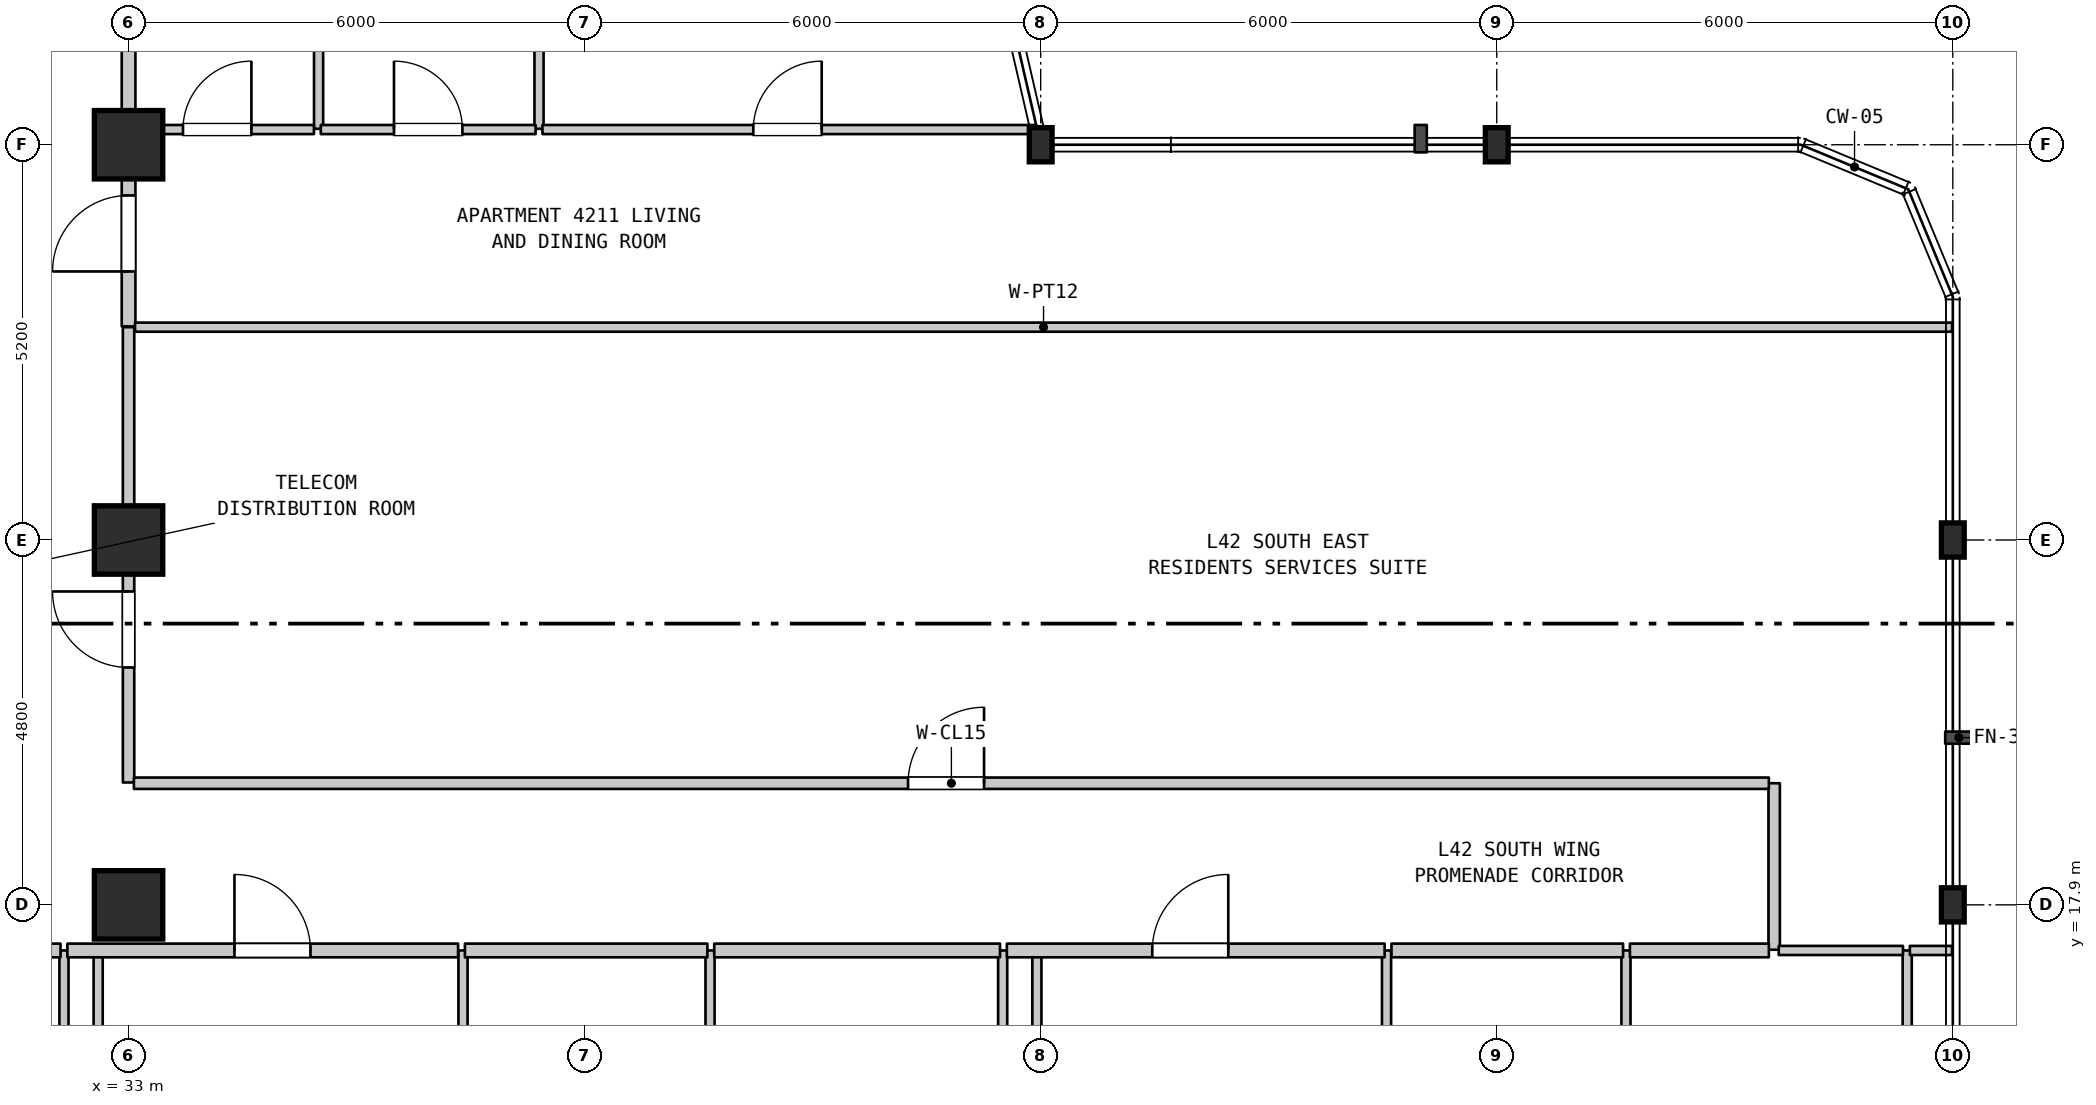
"""IFC4 building model, lengths in metres.
Left out: names, types, materials, properties, quantities, classifications, styles, units other than length and angle.
Written with IfcOpenShell. Run it as: python <this file> out.ifc"""

import sys

from ifc_helpers import new_model, si_unit, direction, frame, frame_2d, origin, origin_2d, place, context, subcontext, project, spatial, rectangle, i_section, extrude, element, fill, save


model = new_model("IFC4")
c1 = context("Model", 3, precision=1e-05, world=origin(), true_north=direction((0.0, 1.0)))
c2 = subcontext(c1, "Body", "Model", "MODEL_VIEW")
j1 = project(units=[si_unit("LENGTHUNIT", "METRE"), si_unit("PLANEANGLEUNIT", "RADIAN")], contexts=[c1])
p1 = place(None, origin())
s1 = spatial("IfcSite", under=j1, at=p1, CompositionType="ELEMENT")
p2 = place(p1, origin())
s2 = spatial("IfcBuilding", under=s1, at=p2, CompositionType="ELEMENT")
p3 = place(p2, frame((0.0, 0.0, 172.8)))
s3 = spatial("IfcBuildingStorey", under=s2, at=p3, CompositionType="ELEMENT", Elevation=172.8)
for number, where, z_axis, x_axis in (
    (1, (33.0, 17.9, 0.0), (0.0, 0.0, 1.0), (1.0, 0.0, 0.0)),
    (2, (33.0, 22.7, 0.0), (0.0, 0.0, 1.0), (1.0, 0.0, 0.0)),
    (3, (33.0, 27.9, 0.0), (0.0, 0.0, 1.0), (1.0, 0.0, 0.0)),
):
    element("IfcColumn", number, at=place(p3, frame(where, z_axis=z_axis, x_axis=x_axis)), inside=s3, PredefinedType="COLUMN", context=c2, shape_type="SweptSolid", body=[
        extrude(rectangle(XDim=0.9, YDim=0.9, at=origin_2d()), origin(), (0.0, 0.0, 1.0), 3.7),
    ])
for number, where, z_axis, x_axis in (
    (4, (45.0, 27.9, 0.0), (0.0, 0.0, 1.0), (1.0, 0.0, 0.0)),
    (5, (51.0, 27.9, 0.0), (0.0, 0.0, 1.0), (1.0, 0.0, 0.0)),
    (6, (57.0, 17.9, 0.0), (0.0, 0.0, 1.0), (1.0, 0.0, 0.0)),
    (7, (57.0, 22.7, 0.0), (0.0, 0.0, 1.0), (1.0, 0.0, 0.0)),
):
    element("IfcColumn", number, at=place(p3, frame(where, z_axis=z_axis, x_axis=x_axis)), inside=s3, PredefinedType="COLUMN", context=c2, shape_type="SweptSolid", body=[
        extrude(i_section(OverallWidth=0.3, OverallDepth=0.45, WebThickness=0.014, FlangeThickness=0.026, FilletRadius=0.027, at=origin_2d()), origin(), (0.0, 0.0, 1.0), 3.7),
    ])
p4 = place(p3, frame((32.15, 11.15, 0.0), z_axis=(0.0, 0.0, 1.0), x_axis=(0.0, 1.0, 0.0)))
e8 = element("IfcWall", 8, at=p4, inside=s3, PredefinedType="PARTITIONING", context=c2, shape_type="SweptSolid", body=[
    extrude(rectangle(XDim=6.15, YDim=0.12, at=frame_2d((3.075, 0.0))), origin(), (0.0, 0.0, 1.0), 3.39),
])
p5 = place(p3, frame((32.6, 14.85, 0.0), z_axis=(0.0, 0.0, 1.0), x_axis=(0.0, 1.0, 0.0)))
e9 = element("IfcWall", 9, at=p5, inside=s3, PredefinedType="PARTITIONING", context=c2, shape_type="SweptSolid", body=[
    extrude(rectangle(XDim=2.45, YDim=0.12, at=frame_2d((1.225, 0.0))), origin(), (0.0, 0.0, 1.0), 3.39),
])
p6 = place(p3, frame((33.0, 19.51, 0.0), z_axis=(0.0, 0.0, 1.0), x_axis=(0.0, 1.0, 0.0)))
e10 = element("IfcWall", 10, at=p6, inside=s3, PredefinedType="STANDARD", context=c2, shape_type="SweptSolid", body=[
    extrude(rectangle(XDim=5.99, YDim=0.15, at=frame_2d((2.995, 0.0))), origin(), (0.0, 0.0, 1.0), 2.99),
])
p7 = place(p6, frame((1.513, 0.0, 0.0)))
e11 = element("IfcOpeningElement", 11, at=p7, cuts=e10, PredefinedType="OPENING", context=c2, shape_type="SweptSolid", body=[
    extrude(rectangle(XDim=1.0, YDim=2.15, at=frame_2d((0.5, 1.075))), frame((0.0, 0.085, 0.0), z_axis=(0.0, -1.0, 0.0), x_axis=(1.0, 0.0, 0.0)), (0.0, 0.0, 1.0), 0.17),
])
p8 = place(p3, frame((33.0, 25.51, 0.0), z_axis=(0.0, 0.0, 1.0), x_axis=(0.0, 1.0, 0.0)))
e12 = element("IfcWall", 12, at=p8, inside=s3, PredefinedType="STANDARD", context=c2, shape_type="SweptSolid", body=[
    extrude(rectangle(XDim=2.6, YDim=0.18, at=frame_2d((1.3, 0.0))), origin(), (0.0, 0.0, 1.0), 2.99),
])
p9 = place(p8, frame((0.723, 0.0, 0.0)))
e13 = element("IfcOpeningElement", 13, at=p9, cuts=e12, PredefinedType="OPENING", context=c2, shape_type="SweptSolid", body=[
    extrude(rectangle(XDim=1.0, YDim=2.15, at=frame_2d((0.5, 1.075))), frame((0.0, 0.1, 0.0), z_axis=(0.0, -1.0, 0.0), x_axis=(1.0, 0.0, 0.0)), (0.0, 0.0, 1.0), 0.2),
])
p10 = place(p3, frame((33.0, 28.11, 0.0), z_axis=(0.0, 0.0, 1.0), x_axis=(0.0, 1.0, 0.0)))
e14 = element("IfcWall", 14, at=p10, inside=s3, PredefinedType="STANDARD", context=c2, shape_type="SweptSolid", body=[
    extrude(rectangle(XDim=4.69, YDim=0.18, at=frame_2d((2.345, 0.0))), origin(), (0.0, 0.0, 1.0), 2.89),
])
p11 = place(p3, frame((35.5, 28.11, 0.0), z_axis=(0.0, 0.0, 1.0), x_axis=(0.0, 1.0, 0.0)))
e15 = element("IfcWall", 15, at=p11, inside=s3, PredefinedType="PARTITIONING", context=c2, shape_type="SweptSolid", body=[
    extrude(rectangle(XDim=4.69, YDim=0.12, at=frame_2d((2.345, 0.0))), origin(), (0.0, 0.0, 1.0), 3.39),
])
p12 = place(p3, frame((37.4, 11.15, 0.0), z_axis=(0.0, 0.0, 1.0), x_axis=(0.0, 1.0, 0.0)))
e16 = element("IfcWall", 16, at=p12, inside=s3, PredefinedType="PARTITIONING", context=c2, shape_type="SweptSolid", body=[
    extrude(rectangle(XDim=6.15, YDim=0.12, at=frame_2d((3.075, 0.0))), origin(), (0.0, 0.0, 1.0), 3.39),
])
p13 = place(p3, frame((38.4, 28.11, 0.0), z_axis=(0.0, 0.0, 1.0), x_axis=(0.0, 1.0, 0.0)))
e17 = element("IfcWall", 17, at=p13, inside=s3, PredefinedType="PARTITIONING", context=c2, shape_type="SweptSolid", body=[
    extrude(rectangle(XDim=4.69, YDim=0.12, at=frame_2d((2.345, 0.0))), origin(), (0.0, 0.0, 1.0), 3.39),
])
for number, where, z_axis, x_axis in (
    (18, (40.65, 11.15, 0.0), (0.0, 0.0, 1.0), (0.0, 1.0, 0.0)),
    (19, (44.5, 11.15, 0.0), (0.0, 0.0, 1.0), (0.0, 1.0, 0.0)),
):
    element("IfcWall", number, at=place(p3, frame(where, z_axis=z_axis, x_axis=x_axis)), inside=s3, PredefinedType="PARTITIONING", context=c2, shape_type="SweptSolid", body=[
        extrude(rectangle(XDim=6.15, YDim=0.12, at=frame_2d((3.075, 0.0))), origin(), (0.0, 0.0, 1.0), 3.39),
    ])
p14 = place(p3, frame((44.95, 0.71, 0.0), z_axis=(0.0, 0.0, 1.0), x_axis=(0.0, 1.0, 0.0)))
e20 = element("IfcWall", 20, at=p14, inside=s3, PredefinedType="PARTITIONING", context=c2, shape_type="SweptSolid", body=[
    extrude(rectangle(XDim=16.59, YDim=0.12, at=frame_2d((8.295, 0.0))), origin(), (0.0, 0.0, 1.0), 3.39),
])
for number, where, z_axis, x_axis in (
    (21, (49.55, 11.15, 0.0), (0.0, 0.0, 1.0), (0.0, 1.0, 0.0)),
    (22, (52.7, 11.15, 0.0), (0.0, 0.0, 1.0), (0.0, 1.0, 0.0)),
):
    element("IfcWall", number, at=place(p3, frame(where, z_axis=z_axis, x_axis=x_axis)), inside=s3, PredefinedType="PARTITIONING", context=c2, shape_type="SweptSolid", body=[
        extrude(rectangle(XDim=6.15, YDim=0.12, at=frame_2d((3.075, 0.0))), origin(), (0.0, 0.0, 1.0), 3.39),
    ])
p15 = place(p3, frame((54.65, 17.31, 0.0), z_axis=(0.0, 0.0, 1.0), x_axis=(0.0, 1.0, 0.0)))
e23 = element("IfcWall", 23, at=p15, inside=s3, PredefinedType="STANDARD", context=c2, shape_type="SweptSolid", body=[
    extrude(rectangle(XDim=2.19, YDim=0.15, at=frame_2d((1.095, 0.0))), origin(), (0.0, 0.0, 1.0), 3.39),
])
p16 = place(p3, frame((56.4, 11.15, 0.0), z_axis=(0.0, 0.0, 1.0), x_axis=(0.0, 1.0, 0.0)))
e24 = element("IfcWall", 24, at=p16, inside=s3, PredefinedType="PARTITIONING", context=c2, shape_type="SweptSolid", body=[
    extrude(rectangle(XDim=6.15, YDim=0.12, at=frame_2d((3.075, 0.0))), origin(), (0.0, 0.0, 1.0), 3.39),
])
p17 = place(p3, frame((28.512, 17.3, 0.0), z_axis=(0.0, 0.0, 1.0), x_axis=(1.0, 0.0, 0.0)))
e25 = element("IfcWall", 25, at=p17, inside=s3, PredefinedType="STANDARD", context=c2, shape_type="SweptSolid", body=[
    extrude(rectangle(XDim=3.593, YDim=0.18, at=frame_2d((1.796, 0.0))), origin(), (0.0, 0.0, 1.0), 3.39),
])
p18 = place(p3, frame((32.195, 17.3, 0.0), z_axis=(0.0, 0.0, 1.0), x_axis=(1.0, 0.0, 0.0)))
e26 = element("IfcWall", 26, at=p18, inside=s3, PredefinedType="STANDARD", context=c2, shape_type="SweptSolid", body=[
    extrude(rectangle(XDim=5.14, YDim=0.18, at=frame_2d((2.57, 0.0))), origin(), (0.0, 0.0, 1.0), 3.39),
])
p19 = place(p18, frame((2.198, 0.0, 0.0)))
e27 = element("IfcOpeningElement", 27, at=p19, cuts=e26, PredefinedType="OPENING", context=c2, shape_type="SweptSolid", body=[
    extrude(rectangle(XDim=1.0, YDim=2.15, at=frame_2d((0.5, 1.075))), frame((0.0, 0.1, 0.0), z_axis=(0.0, -1.0, 0.0), x_axis=(1.0, 0.0, 0.0)), (0.0, 0.0, 1.0), 0.2),
])
p20 = place(p3, frame((37.425, 17.3, 0.0), z_axis=(0.0, 0.0, 1.0), x_axis=(1.0, 0.0, 0.0)))
e28 = element("IfcWall", 28, at=p20, inside=s3, PredefinedType="STANDARD", context=c2, shape_type="SweptSolid", body=[
    extrude(rectangle(XDim=3.19, YDim=0.18, at=frame_2d((1.595, 0.0))), origin(), (0.0, 0.0, 1.0), 3.39),
])
p21 = place(p3, frame((40.705, 17.3, 0.0), z_axis=(0.0, 0.0, 1.0), x_axis=(1.0, 0.0, 0.0)))
e29 = element("IfcWall", 29, at=p21, inside=s3, PredefinedType="STANDARD", context=c2, shape_type="SweptSolid", body=[
    extrude(rectangle(XDim=3.76, YDim=0.18, at=frame_2d((1.88, 0.0))), origin(), (0.0, 0.0, 1.0), 3.39),
])
p22 = place(p3, frame((44.555, 17.3, 0.0), z_axis=(0.0, 0.0, 1.0), x_axis=(1.0, 0.0, 0.0)))
e30 = element("IfcWall", 30, at=p22, inside=s3, PredefinedType="STANDARD", context=c2, shape_type="SweptSolid", body=[
    extrude(rectangle(XDim=4.97, YDim=0.18, at=frame_2d((2.485, 0.0))), origin(), (0.0, 0.0, 1.0), 3.39),
])
p23 = place(p22, frame((1.913, 0.0, 0.0)))
e31 = element("IfcOpeningElement", 31, at=p23, cuts=e30, PredefinedType="OPENING", context=c2, shape_type="SweptSolid", body=[
    extrude(rectangle(XDim=1.0, YDim=2.15, at=frame_2d((0.5, 1.075))), frame((0.0, 0.1, 0.0), z_axis=(0.0, -1.0, 0.0), x_axis=(1.0, 0.0, 0.0)), (0.0, 0.0, 1.0), 0.2),
])
p24 = place(p3, frame((49.615, 17.3, 0.0), z_axis=(0.0, 0.0, 1.0), x_axis=(1.0, 0.0, 0.0)))
e32 = element("IfcWall", 32, at=p24, inside=s3, PredefinedType="STANDARD", context=c2, shape_type="SweptSolid", body=[
    extrude(rectangle(XDim=3.047, YDim=0.18, at=frame_2d((1.523, 0.0))), origin(), (0.0, 0.0, 1.0), 3.39),
])
p25 = place(p3, frame((52.752, 17.3, 0.0), z_axis=(0.0, 0.0, 1.0), x_axis=(1.0, 0.0, 0.0)))
e33 = element("IfcWall", 33, at=p25, inside=s3, PredefinedType="STANDARD", context=c2, shape_type="SweptSolid", body=[
    extrude(rectangle(XDim=1.828, YDim=0.18, at=frame_2d((0.914, 0.0))), origin(), (0.0, 0.0, 1.0), 3.39),
])
p26 = place(p3, frame((54.71, 17.3, 0.0), z_axis=(0.0, 0.0, 1.0), x_axis=(1.0, 0.0, 0.0)))
e34 = element("IfcWall", 34, at=p26, inside=s3, PredefinedType="PARTITIONING", context=c2, shape_type="SweptSolid", body=[
    extrude(rectangle(XDim=1.635, YDim=0.12, at=frame_2d((0.817, 0.0))), origin(), (0.0, 0.0, 1.0), 3.39),
])
p27 = place(p3, frame((56.435, 17.3, 0.0), z_axis=(0.0, 0.0, 1.0), x_axis=(1.0, 0.0, 0.0)))
e35 = element("IfcWall", 35, at=p27, inside=s3, PredefinedType="PARTITIONING", context=c2, shape_type="SweptSolid", body=[
    extrude(rectangle(XDim=0.555, YDim=0.12, at=frame_2d((0.277, 0.0))), origin(), (0.0, 0.0, 1.0), 3.39),
])
p28 = place(p3, frame((33.07, 19.5, 0.0), z_axis=(0.0, 0.0, 1.0), x_axis=(1.0, 0.0, 0.0)))
e36 = element("IfcWall", 36, at=p28, inside=s3, PredefinedType="STANDARD", context=c2, shape_type="SweptSolid", body=[
    extrude(rectangle(XDim=21.51, YDim=0.15, at=frame_2d((10.755, 0.0))), origin(), (0.0, 0.0, 1.0), 3.39),
])
p29 = place(p28, frame((10.185, 0.0, 0.0)))
e37 = element("IfcOpeningElement", 37, at=p29, cuts=e36, PredefinedType="OPENING", context=c2, shape_type="SweptSolid", body=[
    extrude(rectangle(XDim=1.0, YDim=2.15, at=frame_2d((0.5, 1.075))), frame((0.0, 0.085, 0.0), z_axis=(0.0, -1.0, 0.0), x_axis=(1.0, 0.0, 0.0)), (0.0, 0.0, 1.0), 0.17),
])
p30 = place(p3, frame((33.085, 25.5, 0.0), z_axis=(0.0, 0.0, 1.0), x_axis=(1.0, 0.0, 0.0)))
e38 = element("IfcWall", 38, at=p30, inside=s3, PredefinedType="PARTITIONING", context=c2, shape_type="SweptSolid", body=[
    extrude(rectangle(XDim=23.905, YDim=0.12, at=frame_2d((11.953, 0.0))), origin(), (0.0, 0.0, 1.0), 3.39),
])
p31 = place(p3, frame((33.075, 28.1, 0.0), z_axis=(0.0, 0.0, 1.0), x_axis=(1.0, 0.0, 0.0)))
e39 = element("IfcWall", 39, at=p31, inside=s3, PredefinedType="PARTITIONING", context=c2, shape_type="SweptSolid", body=[
    extrude(rectangle(XDim=2.364, YDim=0.12, at=frame_2d((1.182, 0.0))), origin(), (0.0, 0.0, 1.0), 3.39),
])
p32 = place(p31, frame((0.641, 0.0, 0.0)))
e40 = element("IfcOpeningElement", 40, at=p32, cuts=e39, PredefinedType="OPENING", context=c2, shape_type="SweptSolid", body=[
    extrude(rectangle(XDim=0.9, YDim=2.15, at=frame_2d((0.45, 1.075))), frame((0.0, 0.07, 0.0), z_axis=(0.0, -1.0, 0.0), x_axis=(1.0, 0.0, 0.0)), (0.0, 0.0, 1.0), 0.14),
])
p33 = place(p3, frame((35.529, 28.1, 0.0), z_axis=(0.0, 0.0, 1.0), x_axis=(1.0, 0.0, 0.0)))
e41 = element("IfcWall", 41, at=p33, inside=s3, PredefinedType="PARTITIONING", context=c2, shape_type="SweptSolid", body=[
    extrude(rectangle(XDim=2.826, YDim=0.12, at=frame_2d((1.413, 0.0))), origin(), (0.0, 0.0, 1.0), 3.39),
])
p34 = place(p33, frame((0.963, 0.0, 0.0)))
e42 = element("IfcOpeningElement", 42, at=p34, cuts=e41, PredefinedType="OPENING", context=c2, shape_type="SweptSolid", body=[
    extrude(rectangle(XDim=0.9, YDim=2.1, at=frame_2d((0.45, 1.05))), frame((0.0, 0.07, 0.0), z_axis=(0.0, -1.0, 0.0), x_axis=(1.0, 0.0, 0.0)), (0.0, 0.0, 1.0), 0.14),
])
p35 = place(p3, frame((38.445, 28.1, 0.0), z_axis=(0.0, 0.0, 1.0), x_axis=(1.0, 0.0, 0.0)))
e43 = element("IfcWall", 43, at=p35, inside=s3, PredefinedType="PARTITIONING", context=c2, shape_type="SweptSolid", body=[
    extrude(rectangle(XDim=6.499, YDim=0.12, at=frame_2d((3.25, 0.0))), origin(), (0.0, 0.0, 1.0), 3.39),
])
p36 = place(p35, frame((2.774, 0.0, 0.0)))
e44 = element("IfcOpeningElement", 44, at=p36, cuts=e43, PredefinedType="OPENING", context=c2, shape_type="SweptSolid", body=[
    extrude(rectangle(XDim=0.9, YDim=2.15, at=frame_2d((0.45, 1.075))), frame((0.0, 0.07, 0.0), z_axis=(0.0, -1.0, 0.0), x_axis=(1.0, 0.0, 0.0)), (0.0, 0.0, 1.0), 0.14),
])
p37 = place(p7, origin())
e45 = element("IfcDoor", 45, at=p37, inside=s3, OperationType="SINGLE_SWING_RIGHT", PredefinedType="DOOR", context=c2, shape_type="SweptSolid", body=[
    extrude(rectangle(XDim=1.0, YDim=2.15, at=frame_2d((0.5, 1.075))), frame((0.0, 0.025, 0.0), z_axis=(0.0, -1.0, 0.0), x_axis=(1.0, 0.0, 0.0)), (0.0, 0.0, 1.0), 0.05),
])
fill(e11, e45)
p38 = place(p9, origin())
e46 = element("IfcDoor", 46, at=p38, inside=s3, OperationType="SINGLE_SWING_LEFT", PredefinedType="DOOR", context=c2, shape_type="SweptSolid", body=[
    extrude(rectangle(XDim=1.0, YDim=2.15, at=frame_2d((0.5, 1.075))), frame((0.0, 0.025, 0.0), z_axis=(0.0, -1.0, 0.0), x_axis=(1.0, 0.0, 0.0)), (0.0, 0.0, 1.0), 0.05),
])
fill(e13, e46)
p39 = place(p19, origin())
e47 = element("IfcDoor", 47, at=p39, inside=s3, OperationType="SINGLE_SWING_LEFT", PredefinedType="DOOR", context=c2, shape_type="SweptSolid", body=[
    extrude(rectangle(XDim=1.0, YDim=2.15, at=frame_2d((0.5, 1.075))), frame((0.0, 0.025, 0.0), z_axis=(0.0, -1.0, 0.0), x_axis=(1.0, 0.0, 0.0)), (0.0, 0.0, 1.0), 0.05),
])
fill(e27, e47)
p40 = place(p23, origin())
e48 = element("IfcDoor", 48, at=p40, inside=s3, OperationType="SINGLE_SWING_RIGHT", PredefinedType="DOOR", context=c2, shape_type="SweptSolid", body=[
    extrude(rectangle(XDim=1.0, YDim=2.15, at=frame_2d((0.5, 1.075))), frame((0.0, 0.025, 0.0), z_axis=(0.0, -1.0, 0.0), x_axis=(1.0, 0.0, 0.0)), (0.0, 0.0, 1.0), 0.05),
])
fill(e31, e48)
p41 = place(p29, origin())
e49 = element("IfcDoor", 49, at=p41, inside=s3, OperationType="SINGLE_SWING_RIGHT", PredefinedType="DOOR", context=c2, shape_type="SweptSolid", body=[
    extrude(rectangle(XDim=1.0, YDim=2.15, at=frame_2d((0.5, 1.075))), frame((0.0, 0.025, 0.0), z_axis=(0.0, -1.0, 0.0), x_axis=(1.0, 0.0, 0.0)), (0.0, 0.0, 1.0), 0.05),
])
fill(e37, e49)
p42 = place(p32, origin())
e50 = element("IfcDoor", 50, at=p42, inside=s3, OperationType="SINGLE_SWING_RIGHT", PredefinedType="DOOR", context=c2, shape_type="SweptSolid", body=[
    extrude(rectangle(XDim=0.9, YDim=2.15, at=frame_2d((0.45, 1.075))), frame((0.0, 0.025, 0.0), z_axis=(0.0, -1.0, 0.0), x_axis=(1.0, 0.0, 0.0)), (0.0, 0.0, 1.0), 0.05),
])
fill(e40, e50)
p43 = place(p34, origin())
e51 = element("IfcDoor", 51, at=p43, inside=s3, OperationType="SINGLE_SWING_LEFT", PredefinedType="DOOR", context=c2, shape_type="SweptSolid", body=[
    extrude(rectangle(XDim=0.9, YDim=2.1, at=frame_2d((0.45, 1.05))), frame((0.0, 0.025, 0.0), z_axis=(0.0, -1.0, 0.0), x_axis=(1.0, 0.0, 0.0)), (0.0, 0.0, 1.0), 0.05),
])
fill(e42, e51)
p44 = place(p36, origin())
e52 = element("IfcDoor", 52, at=p44, inside=s3, OperationType="SINGLE_SWING_RIGHT", PredefinedType="DOOR", context=c2, shape_type="SweptSolid", body=[
    extrude(rectangle(XDim=0.9, YDim=2.15, at=frame_2d((0.45, 1.075))), frame((0.0, 0.025, 0.0), z_axis=(0.0, -1.0, 0.0), x_axis=(1.0, 0.0, 0.0)), (0.0, 0.0, 1.0), 0.05),
])
fill(e44, e52)
save(model, sys.argv[1])
